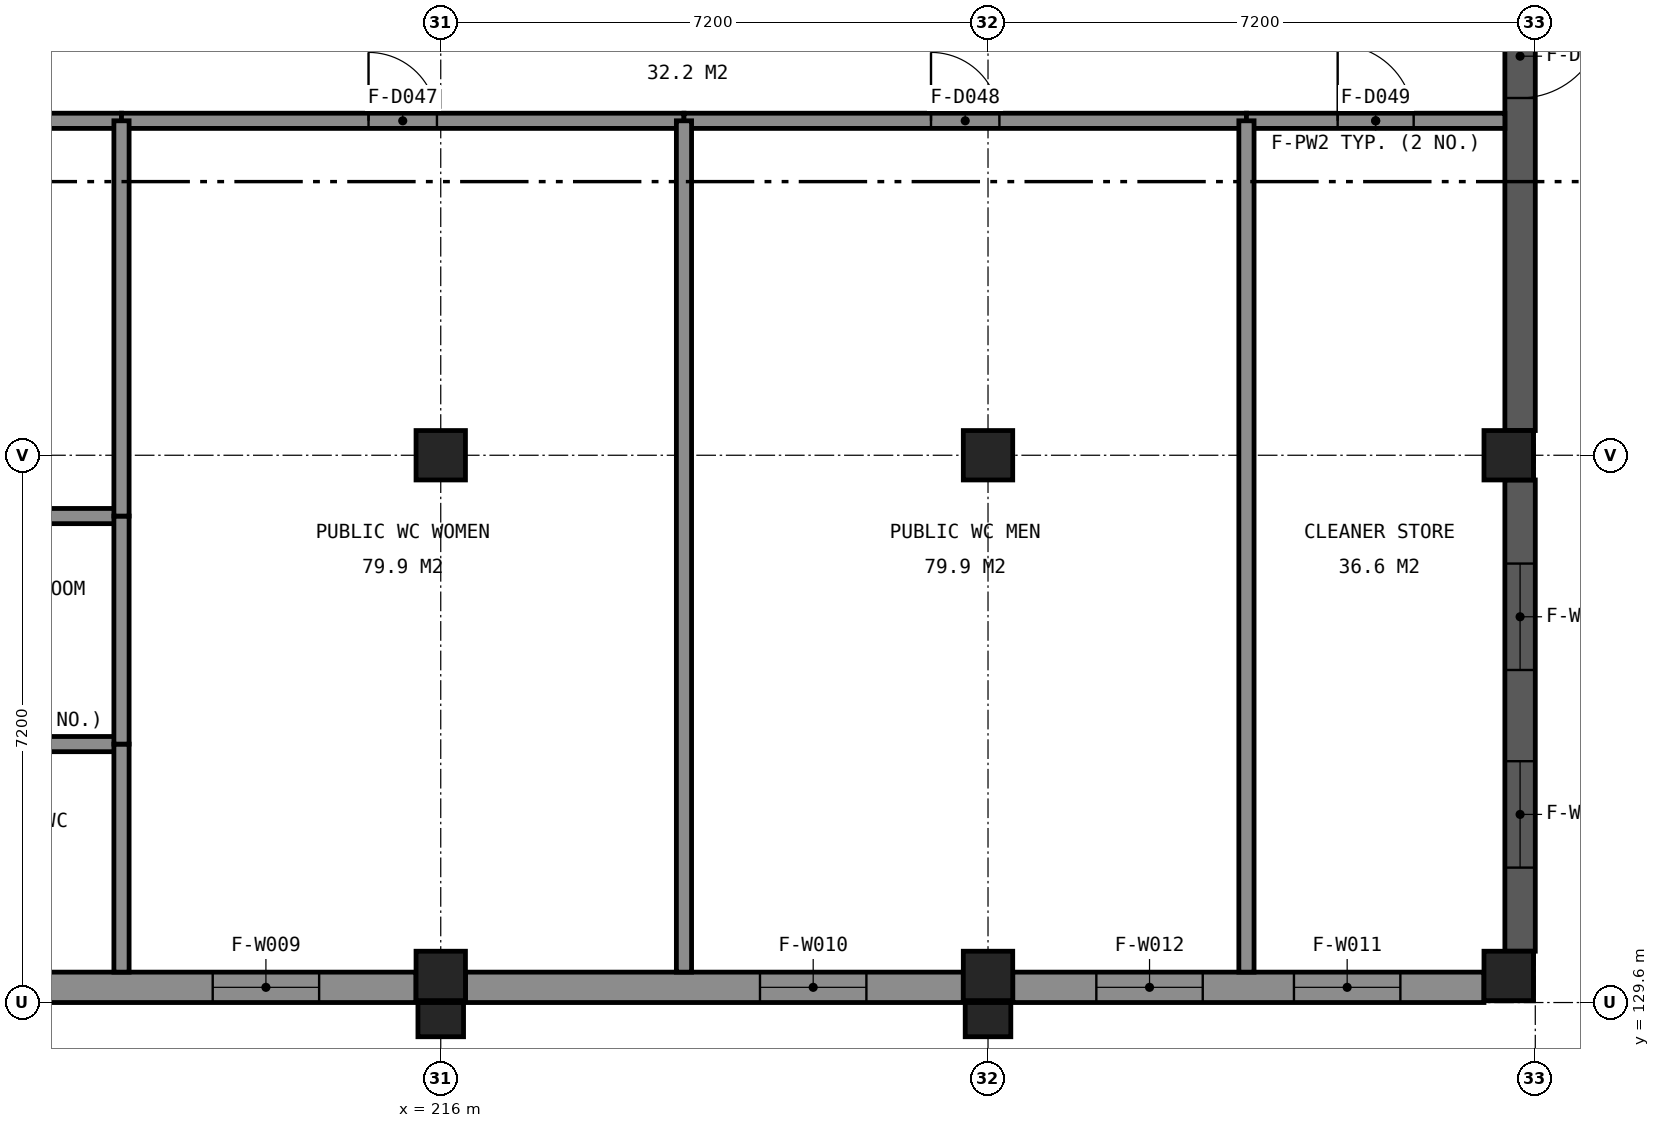
"""IFC4 building model, lengths in metres.
Left out: names, types, materials, properties, quantities, classifications, styles, units other than length and angle.
Written with IfcOpenShell. Run it as: python <this file> out.ifc"""

import sys

from ifc_helpers import new_model, si_unit, direction, frame, frame_2d, origin, origin_2d, place, context, subcontext, project, spatial, rectangle, extrude, element, fill, save


model = new_model("IFC4")
c1 = context("Model", 3, precision=1e-05, world=origin(), true_north=direction((0.0, 1.0)))
c2 = subcontext(c1, "Body", "Model", "MODEL_VIEW")
j1 = project(units=[si_unit("LENGTHUNIT", "METRE"), si_unit("PLANEANGLEUNIT", "RADIAN")], contexts=[c1])
p1 = place(None, origin())
s1 = spatial("IfcSite", under=j1, at=p1, CompositionType="ELEMENT")
p2 = place(p1, origin())
s2 = spatial("IfcBuilding", under=s1, at=p2, CompositionType="ELEMENT")
p3 = place(p2, frame((0.0, 0.0, 4.8)))
s3 = spatial("IfcBuildingStorey", under=s2, at=p3, CompositionType="ELEMENT", Elevation=4.8)
for number, where, z_axis, x_axis in (
    (1, (216.0, 129.95, 0.0), (0.0, 0.0, 1.0), (1.0, 0.0, 0.0)),
    (2, (223.2, 129.95, 0.0), (0.0, 0.0, 1.0), (1.0, 0.0, 0.0)),
    (3, (230.05, 129.95, 0.0), (0.0, 0.0, 1.0), (1.0, 0.0, 0.0)),
    (4, (216.0, 136.8, 0.0), (0.0, 0.0, 1.0), (1.0, 0.0, 0.0)),
    (5, (223.2, 136.8, 0.0), (0.0, 0.0, 1.0), (1.0, 0.0, 0.0)),
    (6, (230.05, 136.8, 0.0), (0.0, 0.0, 1.0), (1.0, 0.0, 0.0)),
):
    element("IfcColumn", number, at=place(p3, frame(where, z_axis=z_axis, x_axis=x_axis)), inside=s3, PredefinedType="COLUMN", context=c2, shape_type="SweptSolid", body=[
        extrude(rectangle(XDim=0.65, YDim=0.65, at=origin_2d()), origin(), (0.0, 0.0, 1.0), 4.8),
    ])
p4 = place(p3, frame((215.675, 129.8, 0.0), z_axis=(0.0, 0.0, 1.0), x_axis=(-1.0, 0.0, 0.0)))
e7 = element("IfcWall", 7, at=p4, inside=s3, PredefinedType="SOLIDWALL", context=c2, shape_type="SweptSolid", body=[
    extrude(rectangle(XDim=6.55, YDim=0.4, at=frame_2d((3.275, 0.0))), origin(), (0.0, 0.0, 1.0), 3.95),
])
p5 = place(p4, frame((1.275, 0.0, 1.0)))
e8 = element("IfcOpeningElement", 8, at=p5, cuts=e7, PredefinedType="OPENING", context=c2, shape_type="SweptSolid", body=[
    extrude(rectangle(XDim=1.4, YDim=1.8, at=frame_2d((0.7, 0.9))), frame((0.0, 0.21, 0.0), z_axis=(0.0, -1.0, 0.0), x_axis=(1.0, 0.0, 0.0)), (0.0, 0.0, 1.0), 0.42),
])
p6 = place(p3, frame((222.875, 129.8, 0.0), z_axis=(0.0, 0.0, 1.0), x_axis=(-1.0, 0.0, 0.0)))
e9 = element("IfcWall", 9, at=p6, inside=s3, PredefinedType="SOLIDWALL", context=c2, shape_type="SweptSolid", body=[
    extrude(rectangle(XDim=6.55, YDim=0.4, at=frame_2d((3.275, 0.0))), origin(), (0.0, 0.0, 1.0), 3.95),
])
p7 = place(p6, frame((1.275, 0.0, 1.0)))
e10 = element("IfcOpeningElement", 10, at=p7, cuts=e9, PredefinedType="OPENING", context=c2, shape_type="SweptSolid", body=[
    extrude(rectangle(XDim=1.4, YDim=1.8, at=frame_2d((0.7, 0.9))), frame((0.0, 0.21, 0.0), z_axis=(0.0, -1.0, 0.0), x_axis=(1.0, 0.0, 0.0)), (0.0, 0.0, 1.0), 0.42),
])
p8 = place(p3, frame((229.725, 129.8, 0.0), z_axis=(0.0, 0.0, 1.0), x_axis=(-1.0, 0.0, 0.0)))
e11 = element("IfcWall", 11, at=p8, inside=s3, PredefinedType="SOLIDWALL", context=c2, shape_type="SweptSolid", body=[
    extrude(rectangle(XDim=6.2, YDim=0.4, at=frame_2d((3.1, 0.0))), origin(), (0.0, 0.0, 1.0), 3.95),
])
p9 = place(p8, frame((1.1, 0.0, 1.0)))
e12 = element("IfcOpeningElement", 12, at=p9, cuts=e11, PredefinedType="OPENING", context=c2, shape_type="SweptSolid", body=[
    extrude(rectangle(XDim=1.4, YDim=1.8, at=frame_2d((0.7, 0.9))), frame((0.0, 0.21, 0.0), z_axis=(0.0, -1.0, 0.0), x_axis=(1.0, 0.0, 0.0)), (0.0, 0.0, 1.0), 0.42),
])
p10 = place(p8, frame((3.7, 0.0, 1.0)))
e13 = element("IfcOpeningElement", 13, at=p10, cuts=e11, PredefinedType="OPENING", context=c2, shape_type="SweptSolid", body=[
    extrude(rectangle(XDim=1.4, YDim=1.8, at=frame_2d((0.7, 0.9))), frame((0.0, 0.21, 0.0), z_axis=(0.0, -1.0, 0.0), x_axis=(1.0, 0.0, 0.0)), (0.0, 0.0, 1.0), 0.42),
])
p11 = place(p3, frame((230.2, 136.475, 0.0), z_axis=(0.0, 0.0, 1.0), x_axis=(0.0, -1.0, 0.0)))
e14 = element("IfcWall", 14, at=p11, inside=s3, PredefinedType="SHEAR", context=c2, shape_type="SweptSolid", body=[
    extrude(rectangle(XDim=6.2, YDim=0.4, at=frame_2d((3.1, 0.0))), origin(), (0.0, 0.0, 1.0), 3.95),
])
p12 = place(p11, frame((1.1, 0.0, 1.0)))
e15 = element("IfcOpeningElement", 15, at=p12, cuts=e14, PredefinedType="OPENING", context=c2, shape_type="SweptSolid", body=[
    extrude(rectangle(XDim=1.4, YDim=1.8, at=frame_2d((0.7, 0.9))), frame((0.0, 0.21, 0.0), z_axis=(0.0, -1.0, 0.0), x_axis=(1.0, 0.0, 0.0)), (0.0, 0.0, 1.0), 0.42),
])
p13 = place(p11, frame((3.7, 0.0, 1.0)))
e16 = element("IfcOpeningElement", 16, at=p13, cuts=e14, PredefinedType="OPENING", context=c2, shape_type="SweptSolid", body=[
    extrude(rectangle(XDim=1.4, YDim=1.8, at=frame_2d((0.7, 0.9))), frame((0.0, 0.21, 0.0), z_axis=(0.0, -1.0, 0.0), x_axis=(1.0, 0.0, 0.0)), (0.0, 0.0, 1.0), 0.42),
])
p14 = place(p3, frame((230.2, 143.2, 0.0), z_axis=(0.0, 0.0, 1.0), x_axis=(0.0, -1.0, 0.0)))
e17 = element("IfcWall", 17, at=p14, inside=s3, PredefinedType="SHEAR", context=c2, shape_type="SweptSolid", body=[
    extrude(rectangle(XDim=6.075, YDim=0.4, at=frame_2d((3.038, 0.0))), origin(), (0.0, 0.0, 1.0), 3.95),
])
p15 = place(p14, frame((0.6, 0.0, 0.0)))
e18 = element("IfcOpeningElement", 18, at=p15, cuts=e17, PredefinedType="OPENING", context=c2, shape_type="SweptSolid", body=[
    extrude(rectangle(XDim=1.1, YDim=2.1, at=frame_2d((0.55, 1.05))), frame((0.0, 0.21, 0.0), z_axis=(0.0, -1.0, 0.0), x_axis=(1.0, 0.0, 0.0)), (0.0, 0.0, 1.0), 0.42),
])
for number, where, z_axis, x_axis in (
    (19, (216.0, 129.375, 0.0), (0.0, 0.0, 1.0), (1.0, 0.0, 0.0)),
    (20, (223.2, 129.375, 0.0), (0.0, 0.0, 1.0), (1.0, 0.0, 0.0)),
):
    element("IfcColumn", number, at=place(p3, frame(where, z_axis=z_axis, x_axis=x_axis)), inside=s3, PredefinedType="PILASTER", context=c2, shape_type="SweptSolid", body=[
        extrude(rectangle(XDim=0.6, YDim=0.45, at=origin_2d()), origin(), (0.0, 0.0, 1.0), 4.8),
    ])
for number, where, z_axis, x_axis in (
    (21, (215.7, 129.475, 0.0), (0.0, 0.0, 1.0), (-1.0, 0.0, 0.0)),
    (22, (222.9, 129.475, 0.0), (0.0, 0.0, 1.0), (-1.0, 0.0, 0.0)),
):
    element("IfcWall", number, at=place(p3, frame(where, z_axis=z_axis, x_axis=x_axis)), inside=s3, PredefinedType="SOLIDWALL", context=c2, shape_type="SweptSolid", body=[
        extrude(rectangle(XDim=6.6, YDim=0.25, at=frame_2d((3.3, 0.0))), origin(), (0.0, 0.0, 1.0), 0.6),
    ])
p16 = place(p3, frame((230.4, 129.475, 0.0), z_axis=(0.0, 0.0, 1.0), x_axis=(-1.0, 0.0, 0.0)))
e23 = element("IfcWall", 23, at=p16, inside=s3, PredefinedType="SOLIDWALL", context=c2, shape_type="SweptSolid", body=[
    extrude(rectangle(XDim=6.9, YDim=0.25, at=frame_2d((3.45, 0.0))), origin(), (0.0, 0.0, 1.0), 0.6),
])
for number, where, z_axis, x_axis in (
    (24, (208.4, 133.0, 0.0), (0.0, 0.0, 1.0), (1.0, 0.0, 0.0)),
    (25, (208.4, 136.0, 0.0), (0.0, 0.0, 1.0), (1.0, 0.0, 0.0)),
):
    element("IfcWall", number, at=place(p3, frame(where, z_axis=z_axis, x_axis=x_axis)), inside=s3, PredefinedType="PARTITIONING", context=c2, shape_type="SweptSolid", body=[
        extrude(rectangle(XDim=3.4, YDim=0.2, at=frame_2d((1.7, 0.0))), origin(), (0.0, 0.0, 1.0), 3.95),
    ])
p17 = place(p3, frame((208.4, 141.2, 0.0), z_axis=(0.0, 0.0, 1.0), x_axis=(1.0, 0.0, 0.0)))
e26 = element("IfcWall", 26, at=p17, inside=s3, PredefinedType="PARTITIONING", context=c2, shape_type="SweptSolid", body=[
    extrude(rectangle(XDim=3.4, YDim=0.2, at=frame_2d((1.7, 0.0))), origin(), (0.0, 0.0, 1.0), 3.95),
])
p18 = place(p17, frame((1.25, 0.0, 0.0)))
e27 = element("IfcOpeningElement", 27, at=p18, cuts=e26, PredefinedType="OPENING", context=c2, shape_type="SweptSolid", body=[
    extrude(rectangle(XDim=0.9, YDim=2.1, at=frame_2d((0.45, 1.05))), frame((0.0, 0.11, 0.0), z_axis=(0.0, -1.0, 0.0), x_axis=(1.0, 0.0, 0.0)), (0.0, 0.0, 1.0), 0.22),
])
p19 = place(p3, frame((211.8, 141.2, 0.0), z_axis=(0.0, 0.0, 1.0), x_axis=(1.0, 0.0, 0.0)))
e28 = element("IfcWall", 28, at=p19, inside=s3, PredefinedType="PARTITIONING", context=c2, shape_type="SweptSolid", body=[
    extrude(rectangle(XDim=7.4, YDim=0.2, at=frame_2d((3.7, 0.0))), origin(), (0.0, 0.0, 1.0), 3.95),
])
p20 = place(p19, frame((3.25, 0.0, 0.0)))
e29 = element("IfcOpeningElement", 29, at=p20, cuts=e28, PredefinedType="OPENING", context=c2, shape_type="SweptSolid", body=[
    extrude(rectangle(XDim=0.9, YDim=2.1, at=frame_2d((0.45, 1.05))), frame((0.0, 0.11, 0.0), z_axis=(0.0, -1.0, 0.0), x_axis=(1.0, 0.0, 0.0)), (0.0, 0.0, 1.0), 0.22),
])
p21 = place(p3, frame((219.2, 141.2, 0.0), z_axis=(0.0, 0.0, 1.0), x_axis=(1.0, 0.0, 0.0)))
e30 = element("IfcWall", 30, at=p21, inside=s3, PredefinedType="PARTITIONING", context=c2, shape_type="SweptSolid", body=[
    extrude(rectangle(XDim=7.4, YDim=0.2, at=frame_2d((3.7, 0.0))), origin(), (0.0, 0.0, 1.0), 3.95),
])
p22 = place(p21, frame((3.25, 0.0, 0.0)))
e31 = element("IfcOpeningElement", 31, at=p22, cuts=e30, PredefinedType="OPENING", context=c2, shape_type="SweptSolid", body=[
    extrude(rectangle(XDim=0.9, YDim=2.1, at=frame_2d((0.45, 1.05))), frame((0.0, 0.11, 0.0), z_axis=(0.0, -1.0, 0.0), x_axis=(1.0, 0.0, 0.0)), (0.0, 0.0, 1.0), 0.22),
])
p23 = place(p3, frame((226.6, 141.2, 0.0), z_axis=(0.0, 0.0, 1.0), x_axis=(1.0, 0.0, 0.0)))
e32 = element("IfcWall", 32, at=p23, inside=s3, PredefinedType="PARTITIONING", context=c2, shape_type="SweptSolid", body=[
    extrude(rectangle(XDim=3.4, YDim=0.2, at=frame_2d((1.7, 0.0))), origin(), (0.0, 0.0, 1.0), 3.95),
])
p24 = place(p23, frame((1.2, 0.0, 0.0)))
e33 = element("IfcOpeningElement", 33, at=p24, cuts=e32, PredefinedType="OPENING", context=c2, shape_type="SweptSolid", body=[
    extrude(rectangle(XDim=1.0, YDim=2.1, at=frame_2d((0.5, 1.05))), frame((0.0, 0.11, 0.0), z_axis=(0.0, -1.0, 0.0), x_axis=(1.0, 0.0, 0.0)), (0.0, 0.0, 1.0), 0.22),
])
for number, where, z_axis, x_axis in (
    (34, (211.8, 130.0, 0.0), (0.0, 0.0, 1.0), (0.0, 1.0, 0.0)),
    (35, (211.8, 133.0, 0.0), (0.0, 0.0, 1.0), (0.0, 1.0, 0.0)),
):
    element("IfcWall", number, at=place(p3, frame(where, z_axis=z_axis, x_axis=x_axis)), inside=s3, PredefinedType="PARTITIONING", context=c2, shape_type="SweptSolid", body=[
        extrude(rectangle(XDim=3.0, YDim=0.2, at=frame_2d((1.5, 0.0))), origin(), (0.0, 0.0, 1.0), 3.95),
    ])
p25 = place(p3, frame((211.8, 136.0, 0.0), z_axis=(0.0, 0.0, 1.0), x_axis=(0.0, 1.0, 0.0)))
e36 = element("IfcWall", 36, at=p25, inside=s3, PredefinedType="PARTITIONING", context=c2, shape_type="SweptSolid", body=[
    extrude(rectangle(XDim=5.2, YDim=0.2, at=frame_2d((2.6, 0.0))), origin(), (0.0, 0.0, 1.0), 3.95),
])
for number, where, z_axis, x_axis in (
    (37, (219.2, 130.0, 0.0), (0.0, 0.0, 1.0), (0.0, 1.0, 0.0)),
    (38, (226.6, 130.0, 0.0), (0.0, 0.0, 1.0), (0.0, 1.0, 0.0)),
):
    element("IfcWall", number, at=place(p3, frame(where, z_axis=z_axis, x_axis=x_axis)), inside=s3, PredefinedType="PARTITIONING", context=c2, shape_type="SweptSolid", body=[
        extrude(rectangle(XDim=11.2, YDim=0.2, at=frame_2d((5.6, 0.0))), origin(), (0.0, 0.0, 1.0), 3.95),
    ])
p26 = place(p5, origin())
e39 = element("IfcWindow", 39, at=p26, inside=s3, PartitioningType="SINGLE_PANEL", PredefinedType="WINDOW", context=c2, shape_type="SweptSolid", body=[
    extrude(rectangle(XDim=1.4, YDim=1.8, at=frame_2d((0.7, 0.9))), frame((0.0, -0.09, 0.0), z_axis=(0.0, -1.0, 0.0), x_axis=(1.0, 0.0, 0.0)), (0.0, 0.0, 1.0), 0.06),
])
fill(e8, e39)
p27 = place(p7, origin())
e40 = element("IfcWindow", 40, at=p27, inside=s3, PartitioningType="SINGLE_PANEL", PredefinedType="WINDOW", context=c2, shape_type="SweptSolid", body=[
    extrude(rectangle(XDim=1.4, YDim=1.8, at=frame_2d((0.7, 0.9))), frame((0.0, -0.09, 0.0), z_axis=(0.0, -1.0, 0.0), x_axis=(1.0, 0.0, 0.0)), (0.0, 0.0, 1.0), 0.06),
])
fill(e10, e40)
p28 = place(p9, origin())
e41 = element("IfcWindow", 41, at=p28, inside=s3, PartitioningType="SINGLE_PANEL", PredefinedType="WINDOW", context=c2, shape_type="SweptSolid", body=[
    extrude(rectangle(XDim=1.4, YDim=1.8, at=frame_2d((0.7, 0.9))), frame((0.0, -0.09, 0.0), z_axis=(0.0, -1.0, 0.0), x_axis=(1.0, 0.0, 0.0)), (0.0, 0.0, 1.0), 0.06),
])
fill(e12, e41)
p29 = place(p10, origin())
e42 = element("IfcWindow", 42, at=p29, inside=s3, PartitioningType="SINGLE_PANEL", PredefinedType="WINDOW", context=c2, shape_type="SweptSolid", body=[
    extrude(rectangle(XDim=1.4, YDim=1.8, at=frame_2d((0.7, 0.9))), frame((0.0, -0.09, 0.0), z_axis=(0.0, -1.0, 0.0), x_axis=(1.0, 0.0, 0.0)), (0.0, 0.0, 1.0), 0.06),
])
fill(e13, e42)
p30 = place(p12, origin())
e43 = element("IfcWindow", 43, at=p30, inside=s3, PartitioningType="SINGLE_PANEL", PredefinedType="WINDOW", context=c2, shape_type="SweptSolid", body=[
    extrude(rectangle(XDim=1.4, YDim=1.8, at=frame_2d((0.7, 0.9))), frame((0.0, -0.09, 0.0), z_axis=(0.0, -1.0, 0.0), x_axis=(1.0, 0.0, 0.0)), (0.0, 0.0, 1.0), 0.06),
])
fill(e15, e43)
p31 = place(p13, origin())
e44 = element("IfcWindow", 44, at=p31, inside=s3, PartitioningType="SINGLE_PANEL", PredefinedType="WINDOW", context=c2, shape_type="SweptSolid", body=[
    extrude(rectangle(XDim=1.4, YDim=1.8, at=frame_2d((0.7, 0.9))), frame((0.0, -0.09, 0.0), z_axis=(0.0, -1.0, 0.0), x_axis=(1.0, 0.0, 0.0)), (0.0, 0.0, 1.0), 0.06),
])
fill(e16, e44)
p32 = place(p15, origin())
e45 = element("IfcDoor", 45, at=p32, inside=s3, OperationType="NOTDEFINED", PredefinedType="DOOR", context=c2, shape_type="SweptSolid", body=[
    extrude(rectangle(XDim=1.1, YDim=2.1, at=frame_2d((0.55, 1.05))), frame((0.0, 0.025, 0.0), z_axis=(0.0, -1.0, 0.0), x_axis=(1.0, 0.0, 0.0)), (0.0, 0.0, 1.0), 0.05),
])
fill(e18, e45)
p33 = place(p20, origin())
e46 = element("IfcDoor", 46, at=p33, inside=s3, OperationType="NOTDEFINED", PredefinedType="DOOR", context=c2, shape_type="SweptSolid", body=[
    extrude(rectangle(XDim=0.9, YDim=2.1, at=frame_2d((0.45, 1.05))), frame((0.0, 0.025, 0.0), z_axis=(0.0, -1.0, 0.0), x_axis=(1.0, 0.0, 0.0)), (0.0, 0.0, 1.0), 0.05),
])
fill(e29, e46)
p34 = place(p22, origin())
e47 = element("IfcDoor", 47, at=p34, inside=s3, OperationType="NOTDEFINED", PredefinedType="DOOR", context=c2, shape_type="SweptSolid", body=[
    extrude(rectangle(XDim=0.9, YDim=2.1, at=frame_2d((0.45, 1.05))), frame((0.0, 0.025, 0.0), z_axis=(0.0, -1.0, 0.0), x_axis=(1.0, 0.0, 0.0)), (0.0, 0.0, 1.0), 0.05),
])
fill(e31, e47)
p35 = place(p24, origin())
e48 = element("IfcDoor", 48, at=p35, inside=s3, OperationType="NOTDEFINED", PredefinedType="DOOR", context=c2, shape_type="SweptSolid", body=[
    extrude(rectangle(XDim=1.0, YDim=2.1, at=frame_2d((0.5, 1.05))), frame((0.0, 0.025, 0.0), z_axis=(0.0, -1.0, 0.0), x_axis=(1.0, 0.0, 0.0)), (0.0, 0.0, 1.0), 0.05),
])
fill(e33, e48)
save(model, sys.argv[1])
